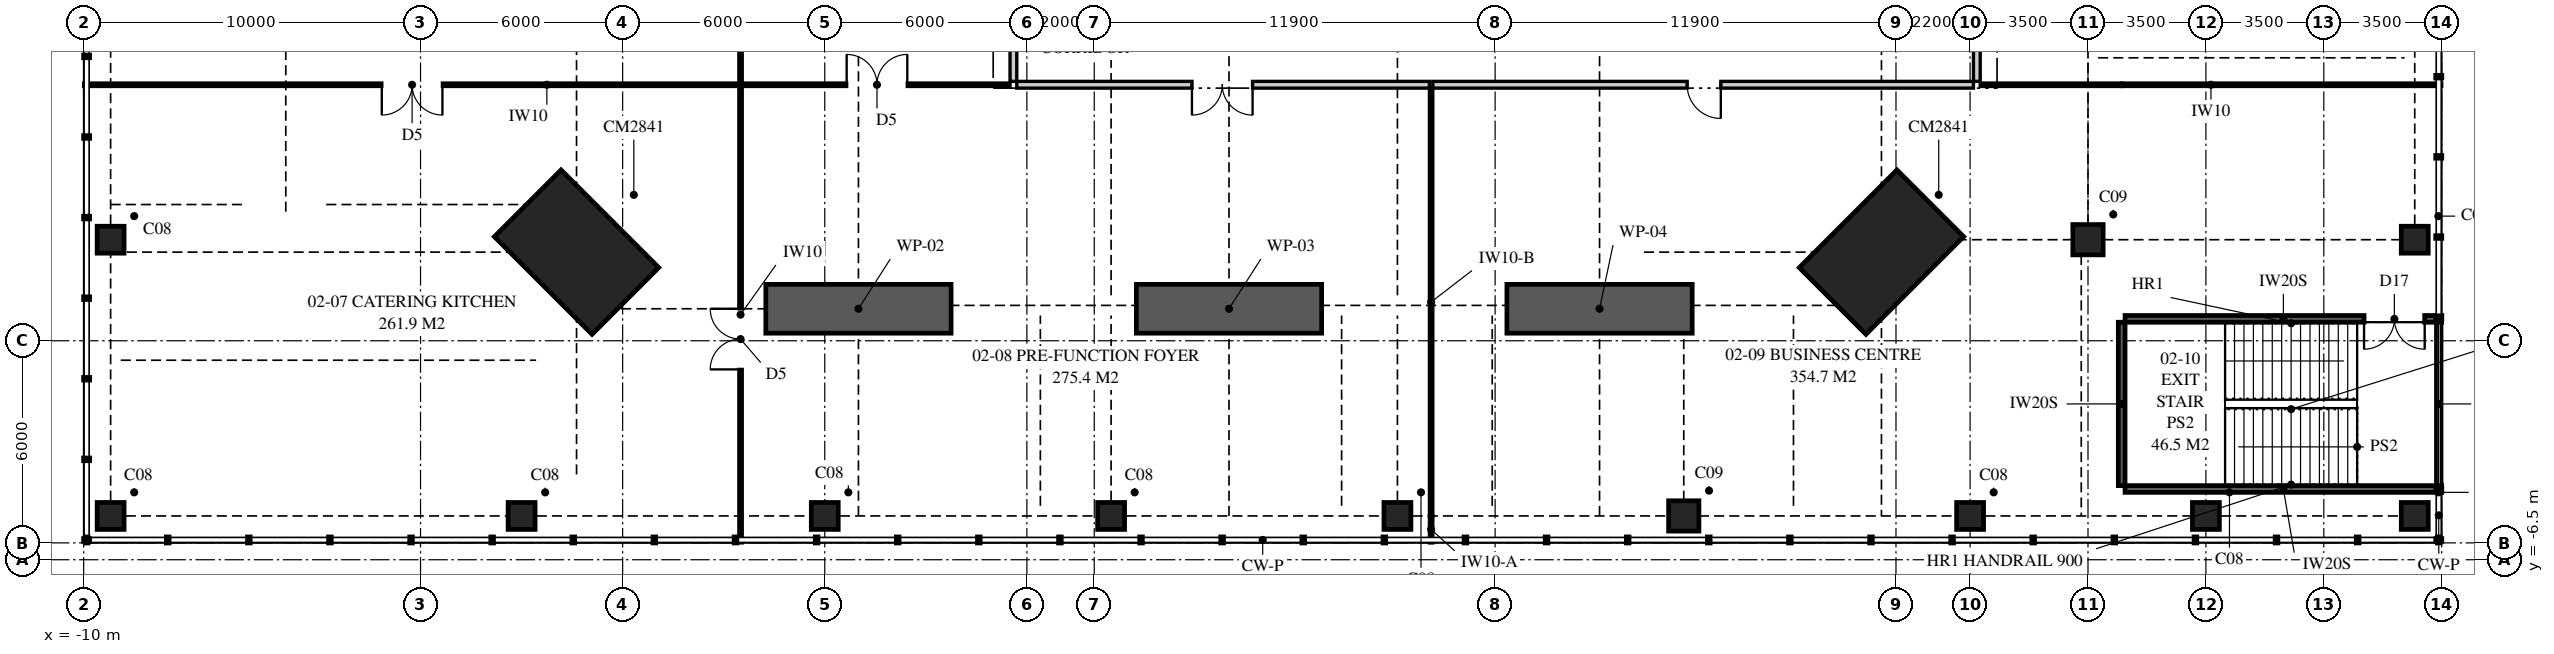
"""IFC4 building model, lengths in metres.
Left out: names, types, materials, properties, quantities, classifications, styles, units other than length and angle.
Written with IfcOpenShell. Run it as: python <this file> out.ifc"""

import sys

from ifc_helpers import new_model, si_unit, direction, frame, frame_2d, origin, origin_2d, place, context, subcontext, project, spatial, polyline, rectangle, outline, extrude, element, fill, save


model = new_model("IFC4")
c1 = context("Model", 3, precision=1e-05, world=origin(), true_north=direction((0.0, 1.0)))
c2 = subcontext(c1, "Body", "Model", "MODEL_VIEW")
j1 = project(units=[si_unit("LENGTHUNIT", "METRE"), si_unit("PLANEANGLEUNIT", "RADIAN")], contexts=[c1])
p1 = place(None, origin())
s1 = spatial("IfcSite", under=j1, at=p1, CompositionType="ELEMENT")
p2 = place(p1, origin())
s2 = spatial("IfcBuilding", under=s1, at=p2, CompositionType="ELEMENT")
p3 = place(p2, frame((0.0, 0.0, 11.0)))
s3 = spatial("IfcBuildingStorey", under=s2, at=p3, CompositionType="ELEMENT", Elevation=11.0)
for number, where, z_axis, x_axis in (
    (1, (4.631, 2.631, 0.0), (0.0, 0.0, 1.0), (0.707, 0.707, 0.0)),
    (2, (43.369, 2.631, 0.0), (0.0, 0.0, 1.0), (-0.707, 0.707, 0.0)),
):
    element("IfcColumn", number, at=place(p3, frame(where, z_axis=z_axis, x_axis=x_axis)), inside=s3, PredefinedType="COLUMN", context=c2, shape_type="SweptSolid", body=[
        extrude(rectangle(XDim=2.8, YDim=4.1, at=origin_2d()), origin(), (0.0, 0.0, 1.0), 5.0),
    ])
for number, where, z_axis, x_axis in (
    (3, (-9.2, -5.2, 0.0), (0.0, 0.0, 1.0), (1.0, 0.0, 0.0)),
    (4, (3.0, -5.2, 0.0), (0.0, 0.0, 1.0), (1.0, 0.0, 0.0)),
    (5, (12.0, -5.2, 0.0), (0.0, 0.0, 1.0), (1.0, 0.0, 0.0)),
    (6, (20.5, -5.2, 0.0), (0.0, 0.0, 1.0), (1.0, 0.0, 0.0)),
    (7, (29.0, -5.2, 0.0), (0.0, 0.0, 1.0), (1.0, 0.0, 0.0)),
):
    element("IfcColumn", number, at=place(p3, frame(where, z_axis=z_axis, x_axis=x_axis)), inside=s3, PredefinedType="COLUMN", context=c2, shape_type="SweptSolid", body=[
        extrude(rectangle(XDim=0.8, YDim=0.8, at=origin_2d()), origin(), (0.0, 0.0, 1.0), 5.0),
    ])
p4 = place(p3, frame((37.5, -5.2, 0.0), z_axis=(0.0, 0.0, 1.0), x_axis=(1.0, 0.0, 0.0)))
e8 = element("IfcColumn", 8, at=p4, inside=s3, PredefinedType="COLUMN", context=c2, shape_type="SweptSolid", body=[
    extrude(rectangle(XDim=0.9, YDim=0.9, at=origin_2d()), origin(), (0.0, 0.0, 1.0), 5.0),
])
for number, where, z_axis, x_axis in (
    (9, (46.0, -5.2, 0.0), (0.0, 0.0, 1.0), (1.0, 0.0, 0.0)),
    (10, (53.0, -5.2, 0.0), (0.0, 0.0, 1.0), (1.0, 0.0, 0.0)),
    (11, (59.2, -5.2, 0.0), (0.0, 0.0, 1.0), (1.0, 0.0, 0.0)),
    (12, (-9.2, 3.0, 0.0), (0.0, 0.0, 1.0), (1.0, 0.0, 0.0)),
):
    element("IfcColumn", number, at=place(p3, frame(where, z_axis=z_axis, x_axis=x_axis)), inside=s3, PredefinedType="COLUMN", context=c2, shape_type="SweptSolid", body=[
        extrude(rectangle(XDim=0.8, YDim=0.8, at=origin_2d()), origin(), (0.0, 0.0, 1.0), 5.0),
    ])
p5 = place(p3, frame((49.5, 3.0, 0.0), z_axis=(0.0, 0.0, 1.0), x_axis=(1.0, 0.0, 0.0)))
e13 = element("IfcColumn", 13, at=p5, inside=s3, PredefinedType="COLUMN", context=c2, shape_type="SweptSolid", body=[
    extrude(rectangle(XDim=0.9, YDim=0.9, at=origin_2d()), origin(), (0.0, 0.0, 1.0), 5.0),
])
p6 = place(p3, frame((59.2, 3.0, 0.0), z_axis=(0.0, 0.0, 1.0), x_axis=(1.0, 0.0, 0.0)))
e14 = element("IfcColumn", 14, at=p6, inside=s3, PredefinedType="COLUMN", context=c2, shape_type="SweptSolid", body=[
    extrude(rectangle(XDim=0.8, YDim=0.8, at=origin_2d()), origin(), (0.0, 0.0, 1.0), 5.0),
])
p7 = place(p3, frame((59.913, -4.45, 0.0), z_axis=(0.0, 0.0, 1.0), x_axis=(0.0, 1.0, 0.0)))
e15 = element("IfcWall", 15, at=p7, inside=s3, PredefinedType="SOLIDWALL", context=c2, shape_type="SweptSolid", body=[
    extrude(rectangle(XDim=5.15, YDim=0.175, at=frame_2d((2.575, 0.0))), origin(), (0.0, 0.0, 1.0), 4.72),
])
p8 = place(p3, frame((9.5, 7.65, 0.0), z_axis=(0.0, 0.0, 1.0), x_axis=(0.0, 1.0, 0.0)))
e16 = element("IfcWall", 16, at=p8, inside=s3, PredefinedType="PARTITIONING", context=c2, shape_type="SweptSolid", body=[
    extrude(outline(polyline([(0.0, 0.0), (5.35, 0.0), (5.35, 4.02), (4.09, 4.02), (4.09, 4.72), (0.0, 4.72), (0.0, 0.0)])), frame((0.0, 0.05, 0.0), z_axis=(0.0, -1.0, 0.0), x_axis=(1.0, 0.0, 0.0)), (0.0, 0.0, 1.0), 0.1),
])
p9 = place(p3, frame((-10.0, 7.6, 0.0), z_axis=(0.0, 0.0, 1.0), x_axis=(1.0, 0.0, 0.0)))
e17 = element("IfcWall", 17, at=p9, inside=s3, PredefinedType="PARTITIONING", context=c2, shape_type="SweptSolid", body=[
    extrude(outline(polyline([(0.0, 0.0), (19.45, 0.0), (19.45, 4.72), (15.891, 4.72), (15.891, 4.02), (13.371, 4.02), (13.371, 4.72), (7.26, 4.72), (7.26, 4.02), (4.74, 4.02), (4.74, 4.72), (1.16, 4.72), (1.16, 3.52), (0.44, 3.52), (0.44, 4.72), (0.0, 4.72), (0.0, 0.0)])), frame((0.0, 0.05, 0.0), z_axis=(0.0, -1.0, 0.0), x_axis=(1.0, 0.0, 0.0)), (0.0, 0.0, 1.0), 0.1),
])
p10 = place(p9, frame((8.85, 0.0, 0.0)))
e18 = element("IfcOpeningElement", 18, at=p10, cuts=e17, PredefinedType="OPENING", context=c2, shape_type="SweptSolid", body=[
    extrude(rectangle(XDim=1.8, YDim=2.1, at=frame_2d((0.9, 1.05))), frame((0.0, 0.06, 0.0), z_axis=(0.0, -1.0, 0.0), x_axis=(1.0, 0.0, 0.0)), (0.0, 0.0, 1.0), 0.12),
])
p11 = place(p3, frame((9.55, 7.6, 0.0), z_axis=(0.0, 0.0, 1.0), x_axis=(1.0, 0.0, 0.0)))
e19 = element("IfcWall", 19, at=p11, inside=s3, PredefinedType="PARTITIONING", context=c2, shape_type="SweptSolid", body=[
    extrude(outline(polyline([(0.0, 0.0), (7.95, 0.0), (7.95, 4.72), (4.71, 4.72), (4.71, 4.02), (2.19, 4.02), (2.19, 4.72), (0.0, 4.72), (0.0, 0.0)])), frame((0.0, 0.05, 0.0), z_axis=(0.0, -1.0, 0.0), x_axis=(1.0, 0.0, 0.0)), (0.0, 0.0, 1.0), 0.1),
])
p12 = place(p11, frame((3.1, 0.0, 0.0)))
e20 = element("IfcOpeningElement", 20, at=p12, cuts=e19, PredefinedType="OPENING", context=c2, shape_type="SweptSolid", body=[
    extrude(rectangle(XDim=1.8, YDim=2.1, at=frame_2d((0.9, 1.05))), frame((0.0, 0.06, 0.0), z_axis=(0.0, -1.0, 0.0), x_axis=(1.0, 0.0, 0.0)), (0.0, 0.0, 1.0), 0.12),
])
p13 = place(p3, frame((17.6, 7.7, 0.0), z_axis=(0.0, 0.0, 1.0), x_axis=(0.0, 1.0, 0.0)))
e21 = element("IfcWall", 21, at=p13, inside=s3, PredefinedType="PARTITIONING", context=c2, shape_type="SweptSolid", body=[
    extrude(rectangle(XDim=1.55, YDim=0.2, at=frame_2d((0.775, 0.0))), origin(), (0.0, 0.0, 1.0), 4.72),
])
p14 = place(p3, frame((9.5, -6.0, 0.0), z_axis=(0.0, 0.0, 1.0), x_axis=(0.0, 1.0, 0.0)))
e22 = element("IfcWall", 22, at=p14, inside=s3, PredefinedType="PARTITIONING", context=c2, shape_type="SweptSolid", body=[
    extrude(outline(polyline([(0.0, 0.0), (13.55, 0.0), (13.55, 4.72), (8.21, 4.72), (8.21, 3.82), (5.69, 3.82), (5.69, 4.72), (2.06, 4.72), (2.06, 4.02), (0.0, 4.02), (0.0, 4.72), (0.0, 0.0)])), frame((0.0, 0.05, 0.0), z_axis=(0.0, -1.0, 0.0), x_axis=(1.0, 0.0, 0.0)), (0.0, 0.0, 1.0), 0.1),
])
p15 = place(p14, frame((5.15, 0.0, 0.0)))
e23 = element("IfcOpeningElement", 23, at=p15, cuts=e22, PredefinedType="OPENING", context=c2, shape_type="SweptSolid", body=[
    extrude(rectangle(XDim=1.8, YDim=2.1, at=frame_2d((0.9, 1.05))), frame((0.0, 0.06, 0.0), z_axis=(0.0, -1.0, 0.0), x_axis=(1.0, 0.0, 0.0)), (0.0, 0.0, 1.0), 0.12),
])
p16 = place(p3, frame((30.0, -6.0, 0.0), z_axis=(0.0, 0.0, 1.0), x_axis=(0.0, 1.0, 0.0)))
e24 = element("IfcWall", 24, at=p16, inside=s3, PredefinedType="PARTITIONING", context=c2, shape_type="SweptSolid", body=[
    extrude(outline(polyline([(0.0, 0.0), (0.8, 0.0), (0.8, 3.52), (0.44, 3.52), (0.44, 4.72), (0.0, 4.72), (0.0, 0.0)])), frame((0.0, 0.05, 0.0), z_axis=(0.0, -1.0, 0.0), x_axis=(1.0, 0.0, 0.0)), (0.0, 0.0, 1.0), 0.1),
])
p17 = place(p3, frame((30.0, -5.2, 0.0), z_axis=(0.0, 0.0, 1.0), x_axis=(0.0, 1.0, 0.0)))
e25 = element("IfcWall", 25, at=p17, inside=s3, PredefinedType="PARTITIONING", context=c2, shape_type="SweptSolid", body=[
    extrude(outline(polyline([(0.0, 0.0), (12.7, 0.0), (12.7, 4.02), (6.55, 4.02), (6.55, 3.52), (5.95, 3.52), (5.95, 4.02), (0.36, 4.02), (0.36, 3.52), (0.0, 3.52), (0.0, 0.0)])), frame((0.0, 0.05, 0.0), z_axis=(0.0, -1.0, 0.0), x_axis=(1.0, 0.0, 0.0)), (0.0, 0.0, 1.0), 0.1),
])
p18 = place(p3, frame((17.7, 7.6, 0.0), z_axis=(0.0, 0.0, 1.0), x_axis=(1.0, 0.0, 0.0)))
e26 = element("IfcWall", 26, at=p18, inside=s3, PredefinedType="PARTITIONING", context=c2, shape_type="SweptSolid", body=[
    extrude(outline(polyline([(0.0, 0.0), (12.25, 0.0), (12.25, 4.72), (12.25, 4.02), (9.99, 4.02), (9.99, 4.72), (7.61, 4.72), (7.61, 4.02), (4.99, 4.02), (4.99, 4.72), (4.11, 4.72), (4.11, 4.02), (1.49, 4.02), (1.49, 4.72), (0.0, 4.72), (0.0, 0.0)])), frame((0.0, 0.1, 0.0), z_axis=(0.0, -1.0, 0.0), x_axis=(1.0, 0.0, 0.0)), (0.0, 0.0, 1.0), 0.2),
])
p19 = place(p18, frame((5.2, 0.0, 0.0)))
e27 = element("IfcOpeningElement", 27, at=p19, cuts=e26, PredefinedType="OPENING", context=c2, shape_type="SweptSolid", body=[
    extrude(rectangle(XDim=1.8, YDim=2.1, at=frame_2d((0.9, 1.05))), frame((0.0, 0.11, 0.0), z_axis=(0.0, -1.0, 0.0), x_axis=(1.0, 0.0, 0.0)), (0.0, 0.0, 1.0), 0.22),
])
p20 = place(p3, frame((50.5, -4.3, 0.0), z_axis=(0.0, 0.0, 1.0), x_axis=(0.0, 1.0, 0.0)))
e28 = element("IfcWall", 28, at=p20, inside=s3, PredefinedType="SOLIDWALL", context=c2, shape_type="SweptSolid", body=[
    extrude(rectangle(XDim=4.85, YDim=0.2, at=frame_2d((2.425, 0.0))), origin(), (0.0, 0.0, 1.0), 5.0),
])
p21 = place(p3, frame((30.05, 7.6, 0.0), z_axis=(0.0, 0.0, 1.0), x_axis=(1.0, 0.0, 0.0)))
e29 = element("IfcWall", 29, at=p21, inside=s3, PredefinedType="PARTITIONING", context=c2, shape_type="SweptSolid", body=[
    extrude(outline(polyline([(0.0, 0.0), (16.05, 0.0), (16.05, 4.72), (14.629, 4.72), (14.629, 3.82), (12.009, 3.82), (12.009, 4.72), (6.26, 4.72), (6.26, 4.02), (3.64, 4.02), (3.64, 4.72), (0.26, 4.72), (0.26, 4.02), (0.0, 4.02), (0.0, 4.72), (0.0, 0.0)])), frame((0.0, 0.1, 0.0), z_axis=(0.0, -1.0, 0.0), x_axis=(1.0, 0.0, 0.0)), (0.0, 0.0, 1.0), 0.2),
])
p22 = place(p21, frame((7.55, 0.0, 0.0)))
e30 = element("IfcOpeningElement", 30, at=p22, cuts=e29, PredefinedType="OPENING", context=c2, shape_type="SweptSolid", body=[
    extrude(rectangle(XDim=1.0, YDim=2.1, at=frame_2d((0.5, 1.05))), frame((0.0, 0.11, 0.0), z_axis=(0.0, -1.0, 0.0), x_axis=(1.0, 0.0, 0.0)), (0.0, 0.0, 1.0), 0.22),
])
p23 = place(p3, frame((46.3, 7.6, 0.0), z_axis=(0.0, 0.0, 1.0), x_axis=(1.0, 0.0, 0.0)))
e31 = element("IfcWall", 31, at=p23, inside=s3, PredefinedType="PARTITIONING", context=c2, shape_type="SweptSolid", body=[
    extrude(outline(polyline([(0.0, 0.0), (4.2, 0.0), (4.2, 4.72), (3.56, 4.72), (3.56, 3.52), (2.84, 3.52), (2.84, 4.72), (0.0, 4.72), (0.0, 0.0)])), frame((0.0, 0.05, 0.0), z_axis=(0.0, -1.0, 0.0), x_axis=(1.0, 0.0, 0.0)), (0.0, 0.0, 1.0), 0.1),
])
p24 = place(p3, frame((50.6, -4.4, 0.0), z_axis=(0.0, 0.0, 1.0), x_axis=(1.0, 0.0, 0.0)))
e32 = element("IfcWall", 32, at=p24, inside=s3, PredefinedType="SOLIDWALL", context=c2, shape_type="SweptSolid", body=[
    extrude(rectangle(XDim=9.4, YDim=0.2, at=frame_2d((4.7, 0.0))), origin(), (0.0, 0.0, 1.0), 5.0),
])
p25 = place(p3, frame((50.6, 0.65, 0.0), z_axis=(0.0, 0.0, 1.0), x_axis=(1.0, 0.0, 0.0)))
e33 = element("IfcWall", 33, at=p25, inside=s3, PredefinedType="SOLIDWALL", context=c2, shape_type="SweptSolid", body=[
    extrude(rectangle(XDim=9.4, YDim=0.2, at=frame_2d((4.7, 0.0))), origin(), (0.0, 0.0, 1.0), 5.0),
])
p26 = place(p25, frame((7.095, 0.0, 0.0)))
e34 = element("IfcOpeningElement", 34, at=p26, cuts=e33, PredefinedType="OPENING", context=c2, shape_type="SweptSolid", body=[
    extrude(rectangle(XDim=1.8, YDim=2.2, at=frame_2d((0.9, 1.1))), frame((0.0, 0.11, 0.0), z_axis=(0.0, -1.0, 0.0), x_axis=(1.0, 0.0, 0.0)), (0.0, 0.0, 1.0), 0.22),
])
p27 = place(p3, frame((50.5, 7.6, 0.0), z_axis=(0.0, 0.0, 1.0), x_axis=(1.0, 0.0, 0.0)))
e35 = element("IfcWall", 35, at=p27, inside=s3, PredefinedType="PARTITIONING", context=c2, shape_type="SweptSolid", body=[
    extrude(outline(polyline([(0.0, 0.0), (9.5, 0.0), (9.5, 4.72), (9.06, 4.72), (9.06, 3.52), (8.34, 3.52), (8.34, 4.72), (0.0, 4.72), (0.0, 0.0)])), frame((0.0, 0.05, 0.0), z_axis=(0.0, -1.0, 0.0), x_axis=(1.0, 0.0, 0.0)), (0.0, 0.0, 1.0), 0.1),
])
p28 = place(p3, frame((46.2, 7.7, 0.0), z_axis=(0.0, 0.0, 1.0), x_axis=(0.0, 1.0, 0.0)))
e36 = element("IfcWall", 36, at=p28, inside=s3, PredefinedType="PARTITIONING", context=c2, shape_type="SweptSolid", body=[
    extrude(rectangle(XDim=1.55, YDim=0.2, at=frame_2d((0.775, 0.0))), origin(), (0.0, 0.0, 1.0), 4.72),
])
for number, where, z_axis, x_axis in (
    (37, (10.25, 0.95, 0.0), (0.0, 0.0, 1.0), (1.0, 0.0, 0.0)),
    (38, (21.25, 0.95, 0.0), (0.0, 0.0, 1.0), (1.0, 0.0, 0.0)),
    (39, (32.25, 0.95, 0.0), (0.0, 0.0, 1.0), (1.0, 0.0, 0.0)),
):
    element("IfcWall", number, at=place(p3, frame(where, z_axis=z_axis, x_axis=x_axis)), inside=s3, PredefinedType="SHEAR", context=c2, shape_type="SweptSolid", body=[
        extrude(rectangle(XDim=5.5, YDim=1.45, at=frame_2d((2.75, 0.0))), origin(), (0.0, 0.0, 1.0), 5.0),
    ])
p29 = place(p10, frame((1.8, 0.0, 0.0), z_axis=(0.0, 0.0, 1.0), x_axis=(-1.0, 0.0, 0.0)))
e40 = element("IfcDoor", 40, at=p29, inside=s3, OperationType="DOUBLE_DOOR_SINGLE_SWING", PredefinedType="DOOR", context=c2, shape_type="SweptSolid", body=[
    extrude(rectangle(XDim=1.8, YDim=2.1, at=frame_2d((0.9, 1.05))), frame((0.0, 0.025, 0.0), z_axis=(0.0, -1.0, 0.0), x_axis=(1.0, 0.0, 0.0)), (0.0, 0.0, 1.0), 0.05),
])
fill(e18, e40)
p30 = place(p15, origin())
e41 = element("IfcDoor", 41, at=p30, inside=s3, OperationType="DOUBLE_DOOR_SINGLE_SWING", PredefinedType="DOOR", context=c2, shape_type="SweptSolid", body=[
    extrude(rectangle(XDim=1.8, YDim=2.1, at=frame_2d((0.9, 1.05))), frame((0.0, 0.025, 0.0), z_axis=(0.0, -1.0, 0.0), x_axis=(1.0, 0.0, 0.0)), (0.0, 0.0, 1.0), 0.05),
])
fill(e23, e41)
p31 = place(p12, origin())
e42 = element("IfcDoor", 42, at=p31, inside=s3, OperationType="DOUBLE_DOOR_SINGLE_SWING", PredefinedType="DOOR", context=c2, shape_type="SweptSolid", body=[
    extrude(rectangle(XDim=1.8, YDim=2.1, at=frame_2d((0.9, 1.05))), frame((0.0, 0.025, 0.0), z_axis=(0.0, -1.0, 0.0), x_axis=(1.0, 0.0, 0.0)), (0.0, 0.0, 1.0), 0.05),
])
fill(e20, e42)
p32 = place(p19, frame((1.8, 0.0, 0.0), z_axis=(0.0, 0.0, 1.0), x_axis=(-1.0, 0.0, 0.0)))
e43 = element("IfcDoor", 43, at=p32, inside=s3, OperationType="DOUBLE_DOOR_SINGLE_SWING", PredefinedType="DOOR", context=c2, shape_type="SweptSolid", body=[
    extrude(rectangle(XDim=1.8, YDim=2.1, at=frame_2d((0.9, 1.05))), frame((0.0, 0.025, 0.0), z_axis=(0.0, -1.0, 0.0), x_axis=(1.0, 0.0, 0.0)), (0.0, 0.0, 1.0), 0.05),
])
fill(e27, e43)
p33 = place(p22, frame((1.0, 0.0, 0.0), z_axis=(0.0, 0.0, 1.0), x_axis=(-1.0, 0.0, 0.0)))
e44 = element("IfcDoor", 44, at=p33, inside=s3, OperationType="SINGLE_SWING_LEFT", PredefinedType="DOOR", context=c2, shape_type="SweptSolid", body=[
    extrude(rectangle(XDim=1.0, YDim=2.1, at=frame_2d((0.5, 1.05))), frame((0.0, 0.025, 0.0), z_axis=(0.0, -1.0, 0.0), x_axis=(1.0, 0.0, 0.0)), (0.0, 0.0, 1.0), 0.05),
])
fill(e30, e44)
p34 = place(p26, frame((1.8, 0.0, 0.0), z_axis=(0.0, 0.0, 1.0), x_axis=(-1.0, 0.0, 0.0)))
e45 = element("IfcDoor", 45, at=p34, inside=s3, OperationType="DOUBLE_DOOR_SINGLE_SWING", PredefinedType="DOOR", context=c2, shape_type="SweptSolid", body=[
    extrude(rectangle(XDim=1.8, YDim=2.2, at=frame_2d((0.9, 1.1))), frame((0.0, 0.025, 0.0), z_axis=(0.0, -1.0, 0.0), x_axis=(1.0, 0.0, 0.0)), (0.0, 0.0, 1.0), 0.05),
])
fill(e34, e45)
save(model, sys.argv[1])
